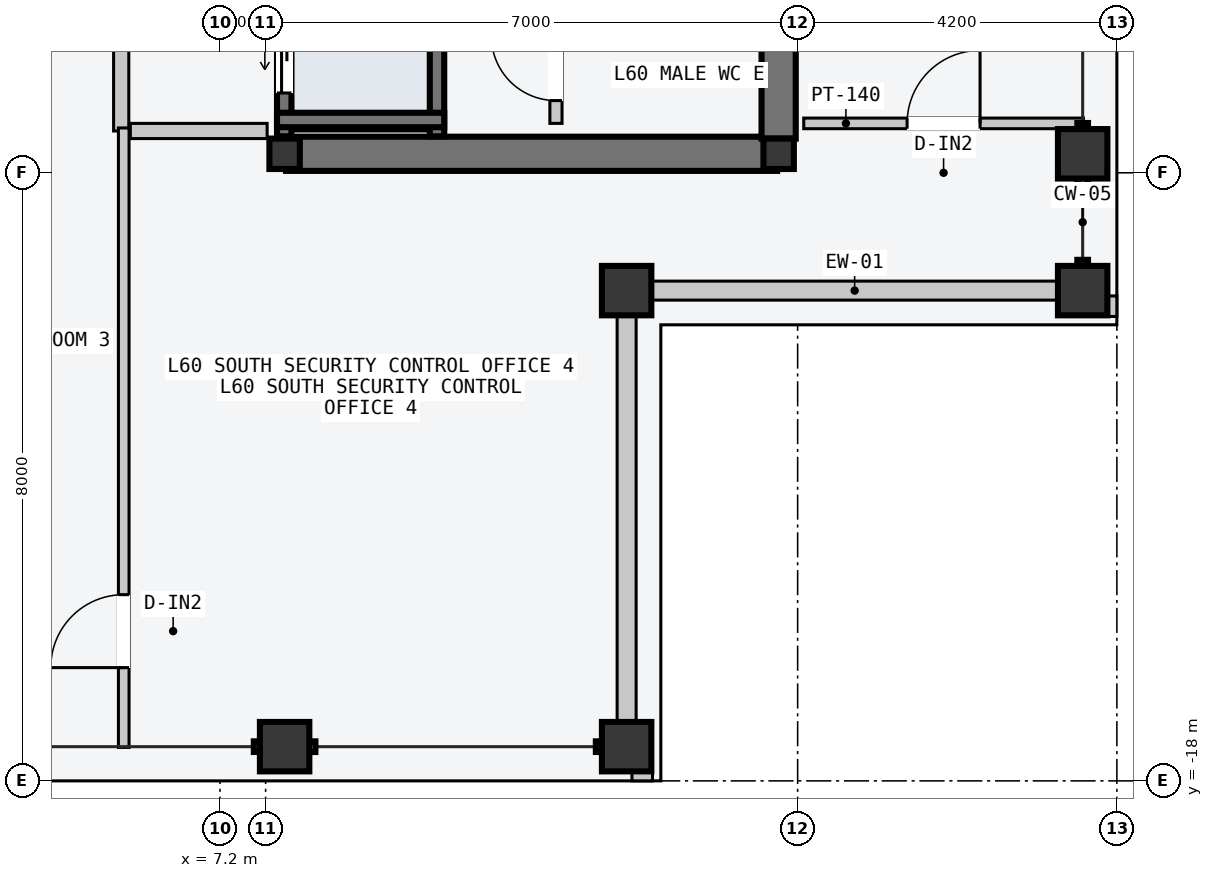
"""IFC4 building model, lengths in metres.
Left out: names, types, materials, properties, quantities, classifications, styles, units other than length and angle.
Written with IfcOpenShell. Run it as: python <this file> out.ifc"""

import sys

from ifc_helpers import new_model, si_unit, direction, frame, frame_2d, origin, origin_2d, place, context, subcontext, project, spatial, rectangle, hollow_rectangle, i_section, extrude, element, fill, save


model = new_model("IFC4")
c1 = context("Model", 3, precision=1e-05, world=origin(), true_north=direction((0.0, 1.0)))
c2 = subcontext(c1, "Body", "Model", "MODEL_VIEW")
j1 = project(units=[si_unit("LENGTHUNIT", "METRE"), si_unit("PLANEANGLEUNIT", "RADIAN")], contexts=[c1])
p1 = place(None, origin())
s1 = spatial("IfcSite", under=j1, at=p1, CompositionType="ELEMENT")
p2 = place(p1, origin())
s2 = spatial("IfcBuilding", under=s1, at=p2, CompositionType="ELEMENT")
p3 = place(p2, frame((0.0, 0.0, 229.2)))
s3 = spatial("IfcBuildingStorey", under=s2, at=p3, CompositionType="ELEMENT", Elevation=229.2)
p4 = place(p3, frame((8.07, -9.75, -0.2), z_axis=(0.0, 0.0, 1.0), x_axis=(1.0, 0.0, 0.0)))
e1 = element("IfcWall", 1, at=p4, inside=s3, PredefinedType="SHEAR", context=c2, shape_type="SweptSolid", body=[
    extrude(rectangle(XDim=6.46, YDim=0.45, at=frame_2d((3.23, 0.0))), origin(), (0.0, 0.0, 1.0), 3.6),
])
p5 = place(p3, frame((14.55, -9.55, -0.2), z_axis=(0.0, 0.0, 1.0), x_axis=(0.0, 1.0, 0.0)))
e2 = element("IfcWall", 2, at=p5, inside=s3, PredefinedType="SHEAR", context=c2, shape_type="SweptSolid", body=[
    extrude(rectangle(XDim=9.35, YDim=0.45, at=frame_2d((4.675, 0.0))), origin(), (0.0, 0.0, 1.0), 3.6),
])
for number, where, z_axis, x_axis in (
    (3, (8.05, -9.75, 0.0), (0.0, 0.0, 1.0), (1.0, 0.0, 0.0)),
    (4, (14.55, -9.75, 0.0), (0.0, 0.0, 1.0), (1.0, 0.0, 0.0)),
):
    element("IfcColumn", number, at=place(p3, frame(where, z_axis=z_axis, x_axis=x_axis)), inside=s3, PredefinedType="COLUMN", context=c2, shape_type="SweptSolid", body=[
        extrude(i_section(OverallWidth=0.4, OverallDepth=0.4, WebThickness=0.013, FlangeThickness=0.021, at=origin_2d()), origin(), (0.0, 0.0, 1.0), 3.6),
    ])
for number, where, z_axis, x_axis in (
    (5, (8.05, -17.55, 0.0), (0.0, 0.0, 1.0), (1.0, 0.0, 0.0)),
    (6, (12.55, -17.55, 0.0), (0.0, 0.0, 1.0), (1.0, 0.0, 0.0)),
    (7, (18.55, -11.55, 0.0), (0.0, 0.0, 1.0), (0.0, 1.0, 0.0)),
    (8, (18.55, -9.75, 0.0), (0.0, 0.0, 1.0), (0.0, 1.0, 0.0)),
    (9, (12.55, -11.55, 0.0), (0.0, 0.0, 1.0), (1.0, 0.0, 0.0)),
):
    element("IfcColumn", number, at=place(p3, frame(where, z_axis=z_axis, x_axis=x_axis)), inside=s3, PredefinedType="COLUMN", context=c2, shape_type="SweptSolid", body=[
        extrude(hollow_rectangle(XDim=0.65, YDim=0.65, WallThickness=0.028, at=origin_2d()), origin(), (0.0, 0.0, 1.0), 3.6),
    ])
for number, where, z_axis, x_axis in (
    (10, (12.885, -11.55, 0.0), (0.0, 0.0, 1.0), (1.0, 0.0, 0.0)),
    (11, (12.55, -17.215, 0.0), (0.0, 0.0, 1.0), (0.0, 1.0, 0.0)),
):
    element("IfcWall", number, at=place(p3, frame(where, z_axis=z_axis, x_axis=x_axis)), inside=s3, PredefinedType="STANDARD", context=c2, shape_type="SweptSolid", body=[
        extrude(rectangle(XDim=5.33, YDim=0.25, at=frame_2d((2.665, 0.0))), origin(), (0.0, 0.0, 1.0), 2.85),
    ])
for number, where, z_axis, x_axis in (
    (12, (12.62, -17.89, 0.0), (0.0, 0.0, 1.0), (1.0, 0.0, 0.0)),
    (13, (18.89, -11.89, 0.0), (0.0, 0.0, 1.0), (0.0, 1.0, 0.0)),
):
    element("IfcWall", number, at=place(p3, frame(where, z_axis=z_axis, x_axis=x_axis)), inside=s3, PredefinedType="PARAPET", context=c2, shape_type="SweptSolid", body=[
        extrude(rectangle(XDim=0.27, YDim=0.22, at=frame_2d((0.135, 0.0))), origin(), (0.0, 0.0, 1.0), 1.2),
    ])
p6 = place(p3, frame((8.045, -9.52, -0.2), z_axis=(0.0, 0.0, 1.0), x_axis=(0.0, 1.0, 0.0)))
e14 = element("IfcWall", 14, at=p6, inside=s3, PredefinedType="SOLIDWALL", context=c2, shape_type="SweptSolid", body=[
    extrude(rectangle(XDim=2.12, YDim=0.19, at=frame_2d((1.06, 0.0))), origin(), (0.0, 0.0, 1.0), 3.6),
])
p7 = place(p6, frame((0.57, 0.0, 0.2)))
e15 = element("IfcOpeningElement", 15, at=p7, cuts=e14, PredefinedType="OPENING", context=c2, shape_type="SweptSolid", body=[
    extrude(rectangle(XDim=1.1, YDim=2.2, at=frame_2d((0.55, 1.1))), frame((0.0, 0.105, 0.0), z_axis=(0.0, -1.0, 0.0), x_axis=(1.0, 0.0, 0.0)), (0.0, 0.0, 1.0), 0.21),
])
p8 = place(p3, frame((10.055, -9.52, -0.2), z_axis=(0.0, 0.0, 1.0), x_axis=(0.0, 1.0, 0.0)))
e16 = element("IfcWall", 16, at=p8, inside=s3, PredefinedType="SOLIDWALL", context=c2, shape_type="SweptSolid", body=[
    extrude(rectangle(XDim=2.12, YDim=0.19, at=frame_2d((1.06, 0.0))), origin(), (0.0, 0.0, 1.0), 3.6),
])
p9 = place(p3, frame((7.95, -9.305, -0.2), z_axis=(0.0, 0.0, 1.0), x_axis=(1.0, 0.0, 0.0)))
e17 = element("IfcWall", 17, at=p9, inside=s3, PredefinedType="SOLIDWALL", context=c2, shape_type="SweptSolid", body=[
    extrude(rectangle(XDim=2.2, YDim=0.19, at=frame_2d((1.1, 0.0))), origin(), (0.0, 0.0, 1.0), 3.6),
])
p10 = place(p3, frame((5.9, -9.45, 0.0), z_axis=(0.0, 0.0, 1.0), x_axis=(0.0, 1.0, 0.0)))
e18 = element("IfcWall", 18, at=p10, inside=s3, PredefinedType="PARTITIONING", context=c2, shape_type="SweptSolid", body=[
    extrude(rectangle(XDim=10.5, YDim=0.2, at=frame_2d((5.25, 0.0))), origin(), (0.0, 0.0, 1.0), 3.4),
])
p11 = place(p10, frame((3.9, 0.0, 0.0)))
e19 = element("IfcOpeningElement", 19, at=p11, cuts=e18, PredefinedType="OPENING", context=c2, shape_type="SweptSolid", body=[
    extrude(rectangle(XDim=1.5, YDim=2.2, at=frame_2d((0.75, 1.1))), frame((0.0, 0.11, 0.0), z_axis=(0.0, -1.0, 0.0), x_axis=(1.0, 0.0, 0.0)), (0.0, 0.0, 1.0), 0.22),
])
p12 = place(p3, frame((6.02, -9.45, 0.0), z_axis=(0.0, 0.0, 1.0), x_axis=(1.0, 0.0, 0.0)))
e20 = element("IfcWall", 20, at=p12, inside=s3, PredefinedType="PARTITIONING", context=c2, shape_type="SweptSolid", body=[
    extrude(rectangle(XDim=1.8, YDim=0.2, at=frame_2d((0.9, 0.0))), origin(), (0.0, 0.0, 1.0), 3.4),
])
p13 = place(p3, frame((11.62, -9.35, 0.0), z_axis=(0.0, 0.0, 1.0), x_axis=(0.0, 1.0, 0.0)))
e21 = element("IfcWall", 21, at=p13, inside=s3, PredefinedType="PARTITIONING", context=c2, shape_type="SweptSolid", body=[
    extrude(rectangle(XDim=3.85, YDim=0.16, at=frame_2d((1.925, 0.0))), origin(), (0.0, 0.0, 1.0), 3.4),
])
p14 = place(p13, frame((0.3, 0.0, 0.0)))
e22 = element("IfcOpeningElement", 22, at=p14, cuts=e21, PredefinedType="OPENING", context=c2, shape_type="SweptSolid", body=[
    extrude(rectangle(XDim=0.85, YDim=2.12, at=frame_2d((0.425, 1.06))), frame((0.0, 0.09, 0.0), z_axis=(0.0, -1.0, 0.0), x_axis=(1.0, 0.0, 0.0)), (0.0, 0.0, 1.0), 0.18),
])
p15 = place(p13, frame((1.5, 0.0, 0.0)))
e23 = element("IfcOpeningElement", 23, at=p15, cuts=e21, PredefinedType="OPENING", context=c2, shape_type="SweptSolid", body=[
    extrude(rectangle(XDim=0.85, YDim=2.12, at=frame_2d((0.425, 1.06))), frame((0.0, 0.09, 0.0), z_axis=(0.0, -1.0, 0.0), x_axis=(1.0, 0.0, 0.0)), (0.0, 0.0, 1.0), 0.18),
])
p16 = place(p13, frame((2.7, 0.0, 0.0)))
e24 = element("IfcOpeningElement", 24, at=p16, cuts=e21, PredefinedType="OPENING", context=c2, shape_type="SweptSolid", body=[
    extrude(rectangle(XDim=0.85, YDim=2.12, at=frame_2d((0.425, 1.06))), frame((0.0, 0.09, 0.0), z_axis=(0.0, -1.0, 0.0), x_axis=(1.0, 0.0, 0.0)), (0.0, 0.0, 1.0), 0.18),
])
p17 = place(p3, frame((5.933, -17.56, 0.0), z_axis=(0.0, 0.0, 1.0), x_axis=(0.0, 1.0, 0.0)))
e25 = element("IfcWall", 25, at=p17, inside=s3, PredefinedType="PARTITIONING", context=c2, shape_type="SweptSolid", body=[
    extrude(rectangle(XDim=8.15, YDim=0.14, at=frame_2d((4.075, 0.0))), origin(), (0.0, 0.0, 1.0), 3.4),
])
p18 = place(p17, frame((1.05, 0.0, 0.0)))
e26 = element("IfcOpeningElement", 26, at=p18, cuts=e25, PredefinedType="OPENING", context=c2, shape_type="SweptSolid", body=[
    extrude(rectangle(XDim=0.96, YDim=2.18, at=frame_2d((0.48, 1.09))), frame((0.0, 0.08, 0.0), z_axis=(0.0, -1.0, 0.0), x_axis=(1.0, 0.0, 0.0)), (0.0, 0.0, 1.0), 0.16),
])
p19 = place(p3, frame((14.88, -9.35, 0.0), z_axis=(0.0, 0.0, 1.0), x_axis=(1.0, 0.0, 0.0)))
e27 = element("IfcWall", 27, at=p19, inside=s3, PredefinedType="PARTITIONING", context=c2, shape_type="SweptSolid", body=[
    extrude(rectangle(XDim=3.68, YDim=0.14, at=frame_2d((1.84, 0.0))), origin(), (0.0, 0.0, 1.0), 3.4),
])
p20 = place(p19, frame((1.36, 0.0, 0.0)))
e28 = element("IfcOpeningElement", 28, at=p20, cuts=e27, PredefinedType="OPENING", context=c2, shape_type="SweptSolid", body=[
    extrude(rectangle(XDim=0.96, YDim=2.18, at=frame_2d((0.48, 1.09))), frame((0.0, 0.08, 0.0), z_axis=(0.0, -1.0, 0.0), x_axis=(1.0, 0.0, 0.0)), (0.0, 0.0, 1.0), 0.16),
])
p21 = place(p7, origin())
e29 = element("IfcDoor", 29, at=p21, inside=s3, OperationType="SLIDING_TO_LEFT", PredefinedType="DOOR", context=c2, shape_type="SweptSolid", body=[
    extrude(rectangle(XDim=1.1, YDim=2.2, at=frame_2d((0.55, 1.1))), frame((0.0, 0.025, 0.0), z_axis=(0.0, -1.0, 0.0), x_axis=(1.0, 0.0, 0.0)), (0.0, 0.0, 1.0), 0.05),
])
fill(e15, e29)
p22 = place(p14, origin())
e30 = element("IfcDoor", 30, at=p22, inside=s3, OperationType="SINGLE_SWING_RIGHT", PredefinedType="DOOR", context=c2, shape_type="SweptSolid", body=[
    extrude(rectangle(XDim=0.85, YDim=2.12, at=frame_2d((0.425, 1.06))), frame((0.0, 0.025, 0.0), z_axis=(0.0, -1.0, 0.0), x_axis=(1.0, 0.0, 0.0)), (0.0, 0.0, 1.0), 0.05),
])
fill(e22, e30)
p23 = place(p18, origin())
e31 = element("IfcDoor", 31, at=p23, inside=s3, OperationType="SINGLE_SWING_LEFT", PredefinedType="DOOR", context=c2, shape_type="SweptSolid", body=[
    extrude(rectangle(XDim=0.96, YDim=2.18, at=frame_2d((0.48, 1.09))), frame((0.0, 0.025, 0.0), z_axis=(0.0, -1.0, 0.0), x_axis=(1.0, 0.0, 0.0)), (0.0, 0.0, 1.0), 0.05),
])
fill(e26, e31)
p24 = place(p20, origin())
e32 = element("IfcDoor", 32, at=p24, inside=s3, OperationType="SINGLE_SWING_RIGHT", PredefinedType="DOOR", context=c2, shape_type="SweptSolid", body=[
    extrude(rectangle(XDim=0.96, YDim=2.18, at=frame_2d((0.48, 1.09))), frame((0.0, 0.025, 0.0), z_axis=(0.0, -1.0, 0.0), x_axis=(1.0, 0.0, 0.0)), (0.0, 0.0, 1.0), 0.05),
])
fill(e28, e32)
save(model, sys.argv[1])
